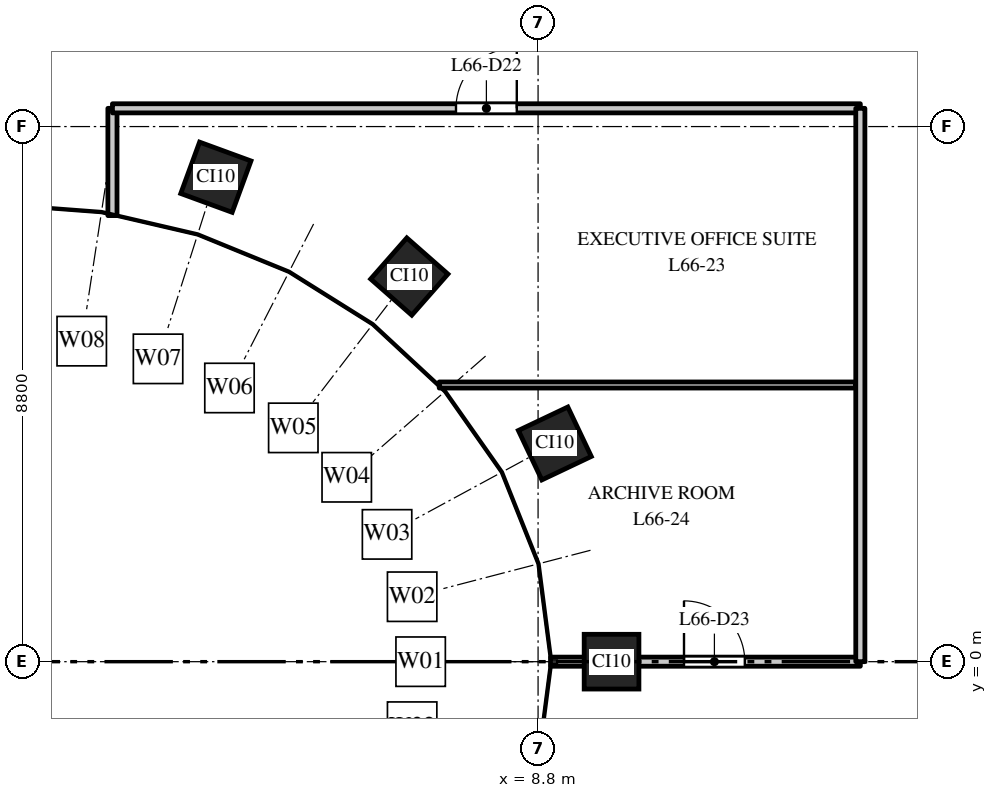
"""IFC4 building model, lengths in metres.
Left out: names, types, materials, properties, quantities, classifications, styles, units other than length and angle.
Written with IfcOpenShell. Run it as: python <this file> out.ifc"""

import sys

from ifc_helpers import new_model, si_unit, direction, frame, frame_2d, origin, origin_2d, place, context, subcontext, project, spatial, rectangle, extrude, element, fill, save


model = new_model("IFC4")
c1 = context("Model", 3, precision=1e-05, world=origin(), true_north=direction((0.0, 1.0)))
c2 = subcontext(c1, "Body", "Model", "MODEL_VIEW")
j1 = project(units=[si_unit("LENGTHUNIT", "METRE"), si_unit("PLANEANGLEUNIT", "RADIAN")], contexts=[c1])
p1 = place(None, origin())
s1 = spatial("IfcSite", under=j1, at=p1, CompositionType="ELEMENT")
p2 = place(p1, origin())
s2 = spatial("IfcBuilding", under=s1, at=p2, CompositionType="ELEMENT")
p3 = place(p2, frame((0.0, 0.0, 307.0)))
s3 = spatial("IfcBuildingStorey", under=s2, at=p3, CompositionType="ELEMENT", Elevation=307.0)
for number, where, z_axis, x_axis in (
    (1, (10.008, 0.0, 0.0), (0.0, 0.0, 1.0), (0.0, 1.0, 0.0)),
    (2, (9.076, 3.588, 0.0), (0.0, 0.0, 1.0), (-0.429, 0.903, 0.0)),
    (3, (6.682, 6.334, 0.0), (0.0, 0.0, 1.0), (-0.751, 0.66, 0.0)),
    (4, (3.501, 7.967, 0.0), (0.0, 0.0, 1.0), (-0.939, 0.344, 0.0)),
):
    element("IfcColumn", number, at=place(p3, frame(where, z_axis=z_axis, x_axis=x_axis)), inside=s3, PredefinedType="COLUMN", context=c2, shape_type="SweptSolid", body=[
        extrude(rectangle(XDim=0.9, YDim=0.9, at=origin_2d()), origin(), (0.0, 0.0, 1.0), 4.0),
    ])
p4 = place(p3, frame((1.8, 7.336, 0.0), z_axis=(0.0, 0.0, 1.0), x_axis=(0.0, 1.0, 0.0)))
e5 = element("IfcWall", 5, at=p4, inside=s3, PredefinedType="PARTITIONING", context=c2, shape_type="SweptSolid", body=[
    extrude(rectangle(XDim=1.764, YDim=0.15, at=frame_2d((0.882, 0.0))), origin(), (0.0, 0.0, 1.0), 3.0),
])
p5 = place(p3, frame((1.8, 9.1, 0.0), z_axis=(0.0, 0.0, 1.0), x_axis=(1.0, 0.0, 0.0)))
e6 = element("IfcWall", 6, at=p5, inside=s3, PredefinedType="PARTITIONING", context=c2, shape_type="SweptSolid", body=[
    extrude(rectangle(XDim=12.3, YDim=0.15, at=frame_2d((6.15, 0.0))), origin(), (0.0, 0.0, 1.0), 2.85),
])
p6 = place(p5, frame((5.65, 0.0, 0.0)))
e7 = element("IfcOpeningElement", 7, at=p6, cuts=e6, PredefinedType="OPENING", context=c2, shape_type="SweptSolid", body=[
    extrude(rectangle(XDim=1.0, YDim=2.1, at=frame_2d((0.5, 1.05))), frame((0.0, 0.085, 0.0), z_axis=(0.0, -1.0, 0.0), x_axis=(1.0, 0.0, 0.0)), (0.0, 0.0, 1.0), 0.17),
])
p7 = place(p3, frame((7.174, 4.55, 0.0), z_axis=(0.0, 0.0, 1.0), x_axis=(1.0, 0.0, 0.0)))
e8 = element("IfcWall", 8, at=p7, inside=s3, PredefinedType="PARTITIONING", context=c2, shape_type="SweptSolid", body=[
    extrude(rectangle(XDim=6.851, YDim=0.1, at=frame_2d((3.425, 0.0))), origin(), (0.0, 0.0, 1.0), 2.75),
])
p8 = place(p3, frame((9.005, 0.0, 0.0), z_axis=(0.0, 0.0, 1.0), x_axis=(1.0, 0.0, 0.0)))
e9 = element("IfcWall", 9, at=p8, inside=s3, PredefinedType="PARTITIONING", context=c2, shape_type="SweptSolid", body=[
    extrude(rectangle(XDim=5.095, YDim=0.15, at=frame_2d((2.548, 0.0))), origin(), (0.0, 0.0, 1.0), 3.7),
])
p9 = place(p8, frame((2.195, 0.0, 0.0)))
e10 = element("IfcOpeningElement", 10, at=p9, cuts=e9, PredefinedType="OPENING", context=c2, shape_type="SweptSolid", body=[
    extrude(rectangle(XDim=1.0, YDim=2.1, at=frame_2d((0.5, 1.05))), frame((0.0, 0.085, 0.0), z_axis=(0.0, -1.0, 0.0), x_axis=(1.0, 0.0, 0.0)), (0.0, 0.0, 1.0), 0.17),
])
p10 = place(p3, frame((14.1, 0.0, 0.0), z_axis=(0.0, 0.0, 1.0), x_axis=(0.0, 1.0, 0.0)))
e11 = element("IfcWall", 11, at=p10, inside=s3, PredefinedType="PARTITIONING", context=c2, shape_type="SweptSolid", body=[
    extrude(rectangle(XDim=9.1, YDim=0.15, at=frame_2d((4.55, 0.0))), origin(), (0.0, 0.0, 1.0), 2.75),
])
p11 = place(p6, origin())
e12 = element("IfcDoor", 12, at=p11, inside=s3, OperationType="SINGLE_SWING_RIGHT", PredefinedType="DOOR", context=c2, shape_type="SweptSolid", body=[
    extrude(rectangle(XDim=1.0, YDim=2.1, at=frame_2d((0.5, 1.05))), frame((0.0, 0.025, 0.0), z_axis=(0.0, -1.0, 0.0), x_axis=(1.0, 0.0, 0.0)), (0.0, 0.0, 1.0), 0.05),
])
fill(e7, e12)
p12 = place(p9, origin())
e13 = element("IfcDoor", 13, at=p12, inside=s3, OperationType="SINGLE_SWING_LEFT", PredefinedType="DOOR", context=c2, shape_type="SweptSolid", body=[
    extrude(rectangle(XDim=1.0, YDim=2.1, at=frame_2d((0.5, 1.05))), frame((0.0, 0.025, 0.0), z_axis=(0.0, -1.0, 0.0), x_axis=(1.0, 0.0, 0.0)), (0.0, 0.0, 1.0), 0.05),
])
fill(e10, e13)
save(model, sys.argv[1])
